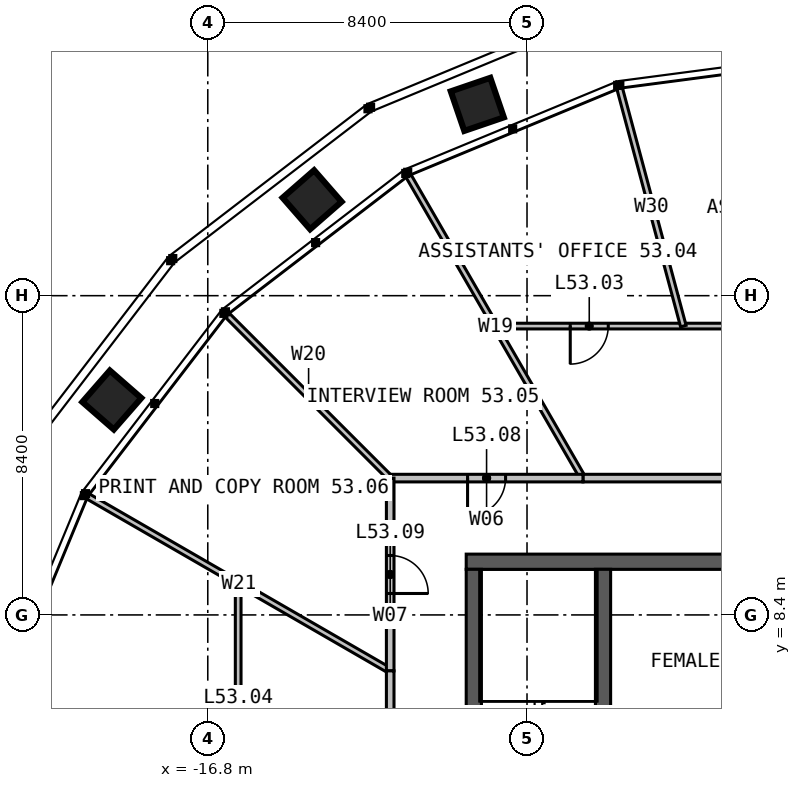
"""IFC4 building model, lengths in metres.
Left out: names, types, materials, properties, quantities, classifications, styles, units other than length and angle.
Written with IfcOpenShell. Run it as: python <this file> out.ifc"""

import sys

from ifc_helpers import new_model, si_unit, direction, frame, frame_2d, origin, place, context, subcontext, project, spatial, rectangle, extrude, element, fill, save


model = new_model("IFC4")
c1 = context("Model", 3, precision=1e-05, world=origin(), true_north=direction((0.0, 1.0)))
c2 = subcontext(c1, "Body", "Model", "MODEL_VIEW")
j1 = project(units=[si_unit("LENGTHUNIT", "METRE"), si_unit("PLANEANGLEUNIT", "RADIAN")], contexts=[c1])
p1 = place(None, origin())
s1 = spatial("IfcSite", under=j1, at=p1, CompositionType="ELEMENT")
p2 = place(p1, origin())
s2 = spatial("IfcBuilding", under=s1, at=p2, CompositionType="ELEMENT")
p3 = place(p2, frame((0.0, 0.0, 220.0)))
s3 = spatial("IfcBuildingStorey", under=s2, at=p3, CompositionType="ELEMENT", Elevation=220.0)
p4 = place(p3, frame((-10.0, 9.8, 0.0), z_axis=(0.0, 0.0, 1.0), x_axis=(1.0, 0.0, 0.0)))
e1 = element("IfcWall", 1, at=p4, inside=s3, PredefinedType="SOLIDWALL", context=c2, shape_type="SweptSolid", body=[
    extrude(rectangle(XDim=20.0, YDim=0.4, at=frame_2d((10.0, 0.0))), origin(), (0.0, 0.0, 1.0), 4.0),
])
p5 = place(p4, frame((9.4, 0.0, 0.0)))
e2 = element("IfcOpeningElement", 2, at=p5, cuts=e1, PredefinedType="OPENING", context=c2, shape_type="SweptSolid", body=[
    extrude(rectangle(XDim=1.2, YDim=2.2, at=frame_2d((0.6, 1.1))), frame((0.0, 0.21, 0.0), z_axis=(0.0, -1.0, 0.0), x_axis=(1.0, 0.0, 0.0)), (0.0, 0.0, 1.0), 0.42),
])
p6 = place(p3, frame((-9.8, 9.6, 0.0), z_axis=(0.0, 0.0, 1.0), x_axis=(0.0, -1.0, 0.0)))
e3 = element("IfcWall", 3, at=p6, inside=s3, PredefinedType="SOLIDWALL", context=c2, shape_type="SweptSolid", body=[
    extrude(rectangle(XDim=19.2, YDim=0.4, at=frame_2d((9.6, 0.0))), origin(), (0.0, 0.0, 1.0), 4.0),
])
p7 = place(p3, frame((-6.4, -9.6, 0.0), z_axis=(0.0, 0.0, 1.0), x_axis=(0.0, 1.0, 0.0)))
e4 = element("IfcWall", 4, at=p7, inside=s3, PredefinedType="SOLIDWALL", context=c2, shape_type="SweptSolid", body=[
    extrude(rectangle(XDim=19.2, YDim=0.4, at=frame_2d((9.6, 0.0))), origin(), (0.0, 0.0, 1.0), 4.0),
])
p8 = place(p7, frame((9.1, 0.0, 0.0)))
e5 = element("IfcOpeningElement", 5, at=p8, cuts=e4, PredefinedType="OPENING", context=c2, shape_type="SweptSolid", body=[
    extrude(rectangle(XDim=1.0, YDim=2.2, at=frame_2d((0.5, 1.1))), frame((0.0, 0.21, 0.0), z_axis=(0.0, -1.0, 0.0), x_axis=(1.0, 0.0, 0.0)), (0.0, 0.0, 1.0), 0.42),
])
p9 = place(p3, frame((-6.928, 12.0, 0.0), z_axis=(0.0, 0.0, 1.0), x_axis=(-0.500006167237, 0.866021843099, 0.0)))
e6 = element("IfcWall", 6, at=p9, inside=s3, PredefinedType="PARTITIONING", context=c2, shape_type="SweptSolid", body=[
    extrude(rectangle(XDim=9.187, YDim=0.15, at=frame_2d((4.594, 0.0))), origin(), (0.0, 0.0, 1.0), 2.89),
])
p10 = place(p3, frame((-12.0, 12.0, 0.0), z_axis=(0.0, 0.0, 1.0), x_axis=(-0.707106781187, 0.707106781187, 0.0)))
e7 = element("IfcWall", 7, at=p10, inside=s3, PredefinedType="PARTITIONING", context=c2, shape_type="SweptSolid", body=[
    extrude(rectangle(XDim=6.073, YDim=0.15, at=frame_2d((3.036, 0.0))), origin(), (0.0, 0.0, 1.0), 2.89),
])
p11 = place(p3, frame((-12.0, 6.928, 0.0), z_axis=(0.0, 0.0, 1.0), x_axis=(-0.866021843099, 0.500006167237, 0.0)))
e8 = element("IfcWall", 8, at=p11, inside=s3, PredefinedType="PARTITIONING", context=c2, shape_type="SweptSolid", body=[
    extrude(rectangle(XDim=9.187, YDim=0.15, at=frame_2d((4.594, 0.0))), origin(), (0.0, 0.0, 1.0), 2.89),
])
p12 = place(p3, frame((9.238, 16.0, 0.0), z_axis=(0.0, 0.0, 1.0), x_axis=(-1.0, 0.0, 0.0)))
e9 = element("IfcWall", 9, at=p12, inside=s3, PredefinedType="PARTITIONING", context=c2, shape_type="SweptSolid", body=[
    extrude(rectangle(XDim=18.475, YDim=0.15, at=frame_2d((9.238, 0.0))), origin(), (0.0, 0.0, 1.0), 2.89),
])
p13 = place(p12, frame((1.975, 0.0, 0.0)))
e10 = element("IfcOpeningElement", 10, at=p13, cuts=e9, PredefinedType="OPENING", context=c2, shape_type="SweptSolid", body=[
    extrude(rectangle(XDim=1.0, YDim=2.2, at=frame_2d((0.5, 1.1))), frame((0.0, 0.085, 0.0), z_axis=(0.0, -1.0, 0.0), x_axis=(1.0, 0.0, 0.0)), (0.0, 0.0, 1.0), 0.17),
])
p14 = place(p12, frame((8.338, 0.0, 0.0)))
e11 = element("IfcOpeningElement", 11, at=p14, cuts=e9, PredefinedType="OPENING", context=c2, shape_type="SweptSolid", body=[
    extrude(rectangle(XDim=1.8, YDim=2.2, at=frame_2d((0.9, 1.1))), frame((0.0, 0.085, 0.0), z_axis=(0.0, -1.0, 0.0), x_axis=(1.0, 0.0, 0.0)), (0.0, 0.0, 1.0), 0.17),
])
p15 = place(p12, frame((15.5, 0.0, 0.0)))
e12 = element("IfcOpeningElement", 12, at=p15, cuts=e9, PredefinedType="OPENING", context=c2, shape_type="SweptSolid", body=[
    extrude(rectangle(XDim=1.0, YDim=2.2, at=frame_2d((0.5, 1.1))), frame((0.0, 0.085, 0.0), z_axis=(0.0, -1.0, 0.0), x_axis=(1.0, 0.0, 0.0)), (0.0, 0.0, 1.0), 0.17),
])
p16 = place(p3, frame((-4.287, 16.0, 0.0), z_axis=(0.0, 0.0, 1.0), x_axis=(-0.258842191576, 0.965919623913, 0.0)))
e13 = element("IfcWall", 13, at=p16, inside=s3, PredefinedType="PARTITIONING", context=c2, shape_type="SweptSolid", body=[
    extrude(rectangle(XDim=6.479, YDim=0.15, at=frame_2d((3.239, 0.0))), origin(), (0.0, 0.0, 1.0), 2.89),
])
p17 = place(p3, frame((6.928, 12.0, 0.0), z_axis=(0.0, 0.0, 1.0), x_axis=(-1.0, 0.0, 0.0)))
e14 = element("IfcWall", 14, at=p17, inside=s3, PredefinedType="PARTITIONING", context=c2, shape_type="SweptSolid", body=[
    extrude(rectangle(XDim=13.856, YDim=0.2, at=frame_2d((6.928, 0.0))), origin(), (0.0, 0.0, 1.0), 3.8),
])
p18 = place(p17, frame((6.028, 0.0, 0.0)))
e15 = element("IfcOpeningElement", 15, at=p18, cuts=e14, PredefinedType="OPENING", context=c2, shape_type="SweptSolid", body=[
    extrude(rectangle(XDim=1.8, YDim=2.2, at=frame_2d((0.9, 1.1))), frame((0.0, 0.11, 0.0), z_axis=(0.0, -1.0, 0.0), x_axis=(1.0, 0.0, 0.0)), (0.0, 0.0, 1.0), 0.22),
])
p19 = place(p3, frame((-6.928, 12.0, 0.0), z_axis=(0.0, 0.0, 1.0), x_axis=(-1.0, 0.0, 0.0)))
e16 = element("IfcWall", 16, at=p19, inside=s3, PredefinedType="PARTITIONING", context=c2, shape_type="SweptSolid", body=[
    extrude(rectangle(XDim=5.072, YDim=0.2, at=frame_2d((2.536, 0.0))), origin(), (0.0, 0.0, 1.0), 3.8),
])
p20 = place(p19, frame((2.036, 0.0, 0.0)))
e17 = element("IfcOpeningElement", 17, at=p20, cuts=e16, PredefinedType="OPENING", context=c2, shape_type="SweptSolid", body=[
    extrude(rectangle(XDim=1.0, YDim=2.2, at=frame_2d((0.5, 1.1))), frame((0.0, 0.11, 0.0), z_axis=(0.0, -1.0, 0.0), x_axis=(1.0, 0.0, 0.0)), (0.0, 0.0, 1.0), 0.22),
])
p21 = place(p3, frame((-12.0, 12.0, 0.0), z_axis=(0.0, 0.0, 1.0), x_axis=(0.0, -1.0, 0.0)))
e18 = element("IfcWall", 18, at=p21, inside=s3, PredefinedType="PARTITIONING", context=c2, shape_type="SweptSolid", body=[
    extrude(rectangle(XDim=5.072, YDim=0.2, at=frame_2d((2.536, 0.0))), origin(), (0.0, 0.0, 1.0), 3.8),
])
p22 = place(p21, frame((2.036, 0.0, 0.0)))
e19 = element("IfcOpeningElement", 19, at=p22, cuts=e18, PredefinedType="OPENING", context=c2, shape_type="SweptSolid", body=[
    extrude(rectangle(XDim=1.0, YDim=2.2, at=frame_2d((0.5, 1.1))), frame((0.0, 0.11, 0.0), z_axis=(0.0, -1.0, 0.0), x_axis=(1.0, 0.0, 0.0)), (0.0, 0.0, 1.0), 0.22),
])
p23 = place(p3, frame((-16.0, 9.238, 0.0), z_axis=(0.0, 0.0, 1.0), x_axis=(0.0, -1.0, 0.0)))
e20 = element("IfcWall", 20, at=p23, inside=s3, PredefinedType="PARTITIONING", context=c2, shape_type="SweptSolid", body=[
    extrude(rectangle(XDim=18.475, YDim=0.15, at=frame_2d((9.238, 0.0))), origin(), (0.0, 0.0, 1.0), 2.89),
])
p24 = place(p23, frame((3.719, 0.0, 0.0)))
e21 = element("IfcOpeningElement", 21, at=p24, cuts=e20, PredefinedType="OPENING", context=c2, shape_type="SweptSolid", body=[
    extrude(rectangle(XDim=1.8, YDim=2.2, at=frame_2d((0.9, 1.1))), frame((0.0, 0.085, 0.0), z_axis=(0.0, -1.0, 0.0), x_axis=(1.0, 0.0, 0.0)), (0.0, 0.0, 1.0), 0.17),
])
p25 = place(p23, frame((12.051, 0.0, 0.0)))
e22 = element("IfcOpeningElement", 22, at=p25, cuts=e20, PredefinedType="OPENING", context=c2, shape_type="SweptSolid", body=[
    extrude(rectangle(XDim=1.0, YDim=2.2, at=frame_2d((0.5, 1.1))), frame((0.0, 0.085, 0.0), z_axis=(0.0, -1.0, 0.0), x_axis=(1.0, 0.0, 0.0)), (0.0, 0.0, 1.0), 0.17),
])
p26 = place(p23, frame((16.67, 0.0, 0.0)))
e23 = element("IfcOpeningElement", 23, at=p26, cuts=e20, PredefinedType="OPENING", context=c2, shape_type="SweptSolid", body=[
    extrude(rectangle(XDim=1.0, YDim=2.2, at=frame_2d((0.5, 1.1))), frame((0.0, 0.085, 0.0), z_axis=(0.0, -1.0, 0.0), x_axis=(1.0, 0.0, 0.0)), (0.0, 0.0, 1.0), 0.17),
])
p27 = place(p3, frame((-12.0, 6.928, 0.0), z_axis=(0.0, 0.0, 1.0), x_axis=(0.0, -1.0, 0.0)))
e24 = element("IfcWall", 24, at=p27, inside=s3, PredefinedType="PARTITIONING", context=c2, shape_type="SweptSolid", body=[
    extrude(rectangle(XDim=13.856, YDim=0.2, at=frame_2d((6.928, 0.0))), origin(), (0.0, 0.0, 1.0), 3.8),
])
p28 = place(p27, frame((6.028, 0.0, 0.0)))
e25 = element("IfcOpeningElement", 25, at=p28, cuts=e24, PredefinedType="OPENING", context=c2, shape_type="SweptSolid", body=[
    extrude(rectangle(XDim=1.8, YDim=2.2, at=frame_2d((0.9, 1.1))), frame((0.0, 0.11, 0.0), z_axis=(0.0, -1.0, 0.0), x_axis=(1.0, 0.0, 0.0)), (0.0, 0.0, 1.0), 0.22),
])
p29 = place(p15, origin())
e26 = element("IfcDoor", 26, at=p29, inside=s3, OperationType="SINGLE_SWING_RIGHT", PredefinedType="DOOR", context=c2, shape_type="SweptSolid", body=[
    extrude(rectangle(XDim=1.0, YDim=2.2, at=frame_2d((0.5, 1.1))), frame((0.0, 0.025, 0.0), z_axis=(0.0, -1.0, 0.0), x_axis=(1.0, 0.0, 0.0)), (0.0, 0.0, 1.0), 0.05),
])
fill(e12, e26)
p30 = place(p20, origin())
e27 = element("IfcDoor", 27, at=p30, inside=s3, OperationType="SINGLE_SWING_RIGHT", PredefinedType="DOOR", context=c2, shape_type="SweptSolid", body=[
    extrude(rectangle(XDim=1.0, YDim=2.2, at=frame_2d((0.5, 1.1))), frame((0.0, 0.025, 0.0), z_axis=(0.0, -1.0, 0.0), x_axis=(1.0, 0.0, 0.0)), (0.0, 0.0, 1.0), 0.05),
])
fill(e17, e27)
p31 = place(p22, origin())
e28 = element("IfcDoor", 28, at=p31, inside=s3, OperationType="SINGLE_SWING_RIGHT", PredefinedType="DOOR", context=c2, shape_type="SweptSolid", body=[
    extrude(rectangle(XDim=1.0, YDim=2.2, at=frame_2d((0.5, 1.1))), frame((0.0, 0.025, 0.0), z_axis=(0.0, -1.0, 0.0), x_axis=(1.0, 0.0, 0.0)), (0.0, 0.0, 1.0), 0.05),
])
fill(e19, e28)
save(model, sys.argv[1])
